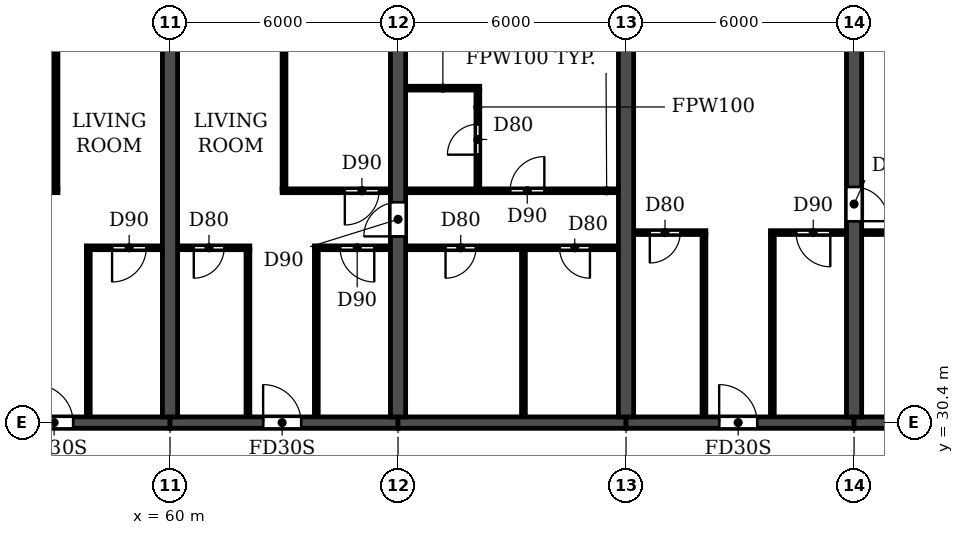
"""IFC4 building model, lengths in metres.
Left out: names, types, materials, properties, quantities, classifications, styles, units other than length and angle.
Written with IfcOpenShell. Run it as: python <this file> out.ifc"""

import sys

from ifc_helpers import new_model, si_unit, direction, frame, frame_2d, origin, place, context, subcontext, project, spatial, rectangle, extrude, element, fill, save


model = new_model("IFC4")
c1 = context("Model", 3, precision=1e-05, world=origin(), true_north=direction((0.0, 1.0)))
c2 = subcontext(c1, "Body", "Model", "MODEL_VIEW")
j1 = project(units=[si_unit("LENGTHUNIT", "METRE"), si_unit("PLANEANGLEUNIT", "RADIAN")], contexts=[c1])
p1 = place(None, origin())
s1 = spatial("IfcSite", under=j1, at=p1, CompositionType="ELEMENT")
p2 = place(p1, origin())
s2 = spatial("IfcBuilding", under=s1, at=p2, CompositionType="ELEMENT")
p3 = place(p2, frame((0.0, 0.0, 23.4)))
s3 = spatial("IfcBuildingStorey", under=s2, at=p3, CompositionType="ELEMENT", Elevation=23.4)
p4 = place(p3, frame((60.0, 30.55, 0.0), z_axis=(0.0, 0.0, 1.0), x_axis=(0.0, 1.0, 0.0)))
e1 = element("IfcWall", 1, at=p4, inside=s3, PredefinedType="SHEAR", context=c2, shape_type="SweptSolid", body=[
    extrude(rectangle(XDim=14.05, YDim=0.4, at=frame_2d((7.025, 0.0))), origin(), (0.0, 0.0, 1.0), 3.05),
])
p5 = place(p3, frame((66.0, 30.55, 0.0), z_axis=(0.0, 0.0, 1.0), x_axis=(0.0, 1.0, 0.0)))
e2 = element("IfcWall", 2, at=p5, inside=s3, PredefinedType="SHEAR", context=c2, shape_type="SweptSolid", body=[
    extrude(rectangle(XDim=14.05, YDim=0.4, at=frame_2d((7.025, 0.0))), origin(), (0.0, 0.0, 1.0), 3.05),
])
p6 = place(p5, frame((4.75, 0.0, 0.0)))
e3 = element("IfcOpeningElement", 3, at=p6, cuts=e2, PredefinedType="OPENING", context=c2, shape_type="SweptSolid", body=[
    extrude(rectangle(XDim=0.9, YDim=2.1, at=frame_2d((0.45, 1.05))), frame((0.0, 0.21, 0.0), z_axis=(0.0, -1.0, 0.0), x_axis=(1.0, 0.0, 0.0)), (0.0, 0.0, 1.0), 0.42),
])
p7 = place(p3, frame((72.0, 30.55, 0.0), z_axis=(0.0, 0.0, 1.0), x_axis=(0.0, 1.0, 0.0)))
e4 = element("IfcWall", 4, at=p7, inside=s3, PredefinedType="SHEAR", context=c2, shape_type="SweptSolid", body=[
    extrude(rectangle(XDim=14.05, YDim=0.4, at=frame_2d((7.025, 0.0))), origin(), (0.0, 0.0, 1.0), 3.05),
])
p8 = place(p3, frame((78.0, 30.55, 0.0), z_axis=(0.0, 0.0, 1.0), x_axis=(0.0, 1.0, 0.0)))
e5 = element("IfcWall", 5, at=p8, inside=s3, PredefinedType="SHEAR", context=c2, shape_type="SweptSolid", body=[
    extrude(rectangle(XDim=14.05, YDim=0.4, at=frame_2d((7.025, 0.0))), origin(), (0.0, 0.0, 1.0), 3.05),
])
p9 = place(p8, frame((5.15, 0.0, 0.0)))
e6 = element("IfcOpeningElement", 6, at=p9, cuts=e5, PredefinedType="OPENING", context=c2, shape_type="SweptSolid", body=[
    extrude(rectangle(XDim=0.9, YDim=2.1, at=frame_2d((0.45, 1.05))), frame((0.0, 0.21, 0.0), z_axis=(0.0, -1.0, 0.0), x_axis=(1.0, 0.0, 0.0)), (0.0, 0.0, 1.0), 0.42),
])
p10 = place(p3, frame((54.0, 30.4, 0.0), z_axis=(0.0, 0.0, 1.0), x_axis=(1.0, 0.0, 0.0)))
e7 = element("IfcWall", 7, at=p10, inside=s3, PredefinedType="SHEAR", context=c2, shape_type="SweptSolid", body=[
    extrude(rectangle(XDim=6.0, YDim=0.3, at=frame_2d((3.0, 0.0))), origin(), (0.0, 0.0, 1.0), 2.45),
])
p11 = place(p10, frame((2.45, 0.0, 0.0)))
e8 = element("IfcOpeningElement", 8, at=p11, cuts=e7, PredefinedType="OPENING", context=c2, shape_type="SweptSolid", body=[
    extrude(rectangle(XDim=1.0, YDim=2.1, at=frame_2d((0.5, 1.05))), frame((0.0, 0.16, 0.0), z_axis=(0.0, -1.0, 0.0), x_axis=(1.0, 0.0, 0.0)), (0.0, 0.0, 1.0), 0.32),
])
p12 = place(p3, frame((60.0, 30.4, 0.0), z_axis=(0.0, 0.0, 1.0), x_axis=(1.0, 0.0, 0.0)))
e9 = element("IfcWall", 9, at=p12, inside=s3, PredefinedType="SHEAR", context=c2, shape_type="SweptSolid", body=[
    extrude(rectangle(XDim=6.0, YDim=0.3, at=frame_2d((3.0, 0.0))), origin(), (0.0, 0.0, 1.0), 2.45),
])
p13 = place(p12, frame((2.45, 0.0, 0.0)))
e10 = element("IfcOpeningElement", 10, at=p13, cuts=e9, PredefinedType="OPENING", context=c2, shape_type="SweptSolid", body=[
    extrude(rectangle(XDim=1.0, YDim=2.1, at=frame_2d((0.5, 1.05))), frame((0.0, 0.16, 0.0), z_axis=(0.0, -1.0, 0.0), x_axis=(1.0, 0.0, 0.0)), (0.0, 0.0, 1.0), 0.32),
])
p14 = place(p3, frame((66.0, 30.4, 0.0), z_axis=(0.0, 0.0, 1.0), x_axis=(1.0, 0.0, 0.0)))
e11 = element("IfcWall", 11, at=p14, inside=s3, PredefinedType="SHEAR", context=c2, shape_type="SweptSolid", body=[
    extrude(rectangle(XDim=6.0, YDim=0.3, at=frame_2d((3.0, 0.0))), origin(), (0.0, 0.0, 1.0), 2.45),
])
p15 = place(p3, frame((72.0, 30.4, 0.0), z_axis=(0.0, 0.0, 1.0), x_axis=(1.0, 0.0, 0.0)))
e12 = element("IfcWall", 12, at=p15, inside=s3, PredefinedType="SHEAR", context=c2, shape_type="SweptSolid", body=[
    extrude(rectangle(XDim=6.0, YDim=0.3, at=frame_2d((3.0, 0.0))), origin(), (0.0, 0.0, 1.0), 2.45),
])
p16 = place(p15, frame((2.45, 0.0, 0.0)))
e13 = element("IfcOpeningElement", 13, at=p16, cuts=e12, PredefinedType="OPENING", context=c2, shape_type="SweptSolid", body=[
    extrude(rectangle(XDim=1.0, YDim=2.1, at=frame_2d((0.5, 1.05))), frame((0.0, 0.16, 0.0), z_axis=(0.0, -1.0, 0.0), x_axis=(1.0, 0.0, 0.0)), (0.0, 0.0, 1.0), 0.32),
])
p17 = place(p3, frame((78.0, 30.4, 0.0), z_axis=(0.0, 0.0, 1.0), x_axis=(1.0, 0.0, 0.0)))
e14 = element("IfcWall", 14, at=p17, inside=s3, PredefinedType="SHEAR", context=c2, shape_type="SweptSolid", body=[
    extrude(rectangle(XDim=6.0, YDim=0.3, at=frame_2d((3.0, 0.0))), origin(), (0.0, 0.0, 1.0), 2.45),
])
p18 = place(p3, frame((57.8, 35.0, 0.0), z_axis=(0.0, 0.0, 1.0), x_axis=(1.0, 0.0, 0.0)))
e15 = element("IfcWall", 15, at=p18, inside=s3, PredefinedType="PARTITIONING", context=c2, shape_type="SweptSolid", body=[
    extrude(rectangle(XDim=1.99, YDim=0.1, at=frame_2d((0.995, 0.0))), origin(), (0.0, 0.0, 1.0), 3.05),
])
p19 = place(p18, frame((0.675, 0.0, 0.0)))
e16 = element("IfcOpeningElement", 16, at=p19, cuts=e15, PredefinedType="OPENING", context=c2, shape_type="SweptSolid", body=[
    extrude(rectangle(XDim=0.9, YDim=2.1, at=frame_2d((0.45, 1.05))), frame((0.0, 0.06, 0.0), z_axis=(0.0, -1.0, 0.0), x_axis=(1.0, 0.0, 0.0)), (0.0, 0.0, 1.0), 0.12),
])
p20 = place(p3, frame((60.21, 35.0, 0.0), z_axis=(0.0, 0.0, 1.0), x_axis=(1.0, 0.0, 0.0)))
e17 = element("IfcWall", 17, at=p20, inside=s3, PredefinedType="PARTITIONING", context=c2, shape_type="SweptSolid", body=[
    extrude(rectangle(XDim=1.89, YDim=0.1, at=frame_2d((0.945, 0.0))), origin(), (0.0, 0.0, 1.0), 3.05),
])
p21 = place(p20, frame((0.415, 0.0, 0.0)))
e18 = element("IfcOpeningElement", 18, at=p21, cuts=e17, PredefinedType="OPENING", context=c2, shape_type="SweptSolid", body=[
    extrude(rectangle(XDim=0.8, YDim=2.1, at=frame_2d((0.4, 1.05))), frame((0.0, 0.06, 0.0), z_axis=(0.0, -1.0, 0.0), x_axis=(1.0, 0.0, 0.0)), (0.0, 0.0, 1.0), 0.12),
])
p22 = place(p3, frame((63.8, 35.0, 0.0), z_axis=(0.0, 0.0, 1.0), x_axis=(1.0, 0.0, 0.0)))
e19 = element("IfcWall", 19, at=p22, inside=s3, PredefinedType="PARTITIONING", context=c2, shape_type="SweptSolid", body=[
    extrude(rectangle(XDim=1.99, YDim=0.1, at=frame_2d((0.995, 0.0))), origin(), (0.0, 0.0, 1.0), 3.05),
])
p23 = place(p22, frame((0.675, 0.0, 0.0)))
e20 = element("IfcOpeningElement", 20, at=p23, cuts=e19, PredefinedType="OPENING", context=c2, shape_type="SweptSolid", body=[
    extrude(rectangle(XDim=0.9, YDim=2.1, at=frame_2d((0.45, 1.05))), frame((0.0, 0.06, 0.0), z_axis=(0.0, -1.0, 0.0), x_axis=(1.0, 0.0, 0.0)), (0.0, 0.0, 1.0), 0.12),
])
p24 = place(p3, frame((66.21, 35.0, 0.0), z_axis=(0.0, 0.0, 1.0), x_axis=(1.0, 0.0, 0.0)))
e21 = element("IfcWall", 21, at=p24, inside=s3, PredefinedType="PARTITIONING", context=c2, shape_type="SweptSolid", body=[
    extrude(rectangle(XDim=5.58, YDim=0.1, at=frame_2d((2.79, 0.0))), origin(), (0.0, 0.0, 1.0), 3.05),
])
p25 = place(p24, frame((1.04, 0.0, 0.0)))
e22 = element("IfcOpeningElement", 22, at=p25, cuts=e21, PredefinedType="OPENING", context=c2, shape_type="SweptSolid", body=[
    extrude(rectangle(XDim=0.8, YDim=2.1, at=frame_2d((0.4, 1.05))), frame((0.0, 0.06, 0.0), z_axis=(0.0, -1.0, 0.0), x_axis=(1.0, 0.0, 0.0)), (0.0, 0.0, 1.0), 0.12),
])
p26 = place(p24, frame((4.04, 0.0, 0.0)))
e23 = element("IfcOpeningElement", 23, at=p26, cuts=e21, PredefinedType="OPENING", context=c2, shape_type="SweptSolid", body=[
    extrude(rectangle(XDim=0.8, YDim=2.1, at=frame_2d((0.4, 1.05))), frame((0.0, 0.06, 0.0), z_axis=(0.0, -1.0, 0.0), x_axis=(1.0, 0.0, 0.0)), (0.0, 0.0, 1.0), 0.12),
])
p27 = place(p3, frame((72.21, 35.4, 0.0), z_axis=(0.0, 0.0, 1.0), x_axis=(1.0, 0.0, 0.0)))
e24 = element("IfcWall", 24, at=p27, inside=s3, PredefinedType="PARTITIONING", context=c2, shape_type="SweptSolid", body=[
    extrude(rectangle(XDim=1.89, YDim=0.1, at=frame_2d((0.945, 0.0))), origin(), (0.0, 0.0, 1.0), 3.05),
])
p28 = place(p27, frame((0.415, 0.0, 0.0)))
e25 = element("IfcOpeningElement", 25, at=p28, cuts=e24, PredefinedType="OPENING", context=c2, shape_type="SweptSolid", body=[
    extrude(rectangle(XDim=0.8, YDim=2.1, at=frame_2d((0.4, 1.05))), frame((0.0, 0.06, 0.0), z_axis=(0.0, -1.0, 0.0), x_axis=(1.0, 0.0, 0.0)), (0.0, 0.0, 1.0), 0.12),
])
p29 = place(p3, frame((75.8, 35.4, 0.0), z_axis=(0.0, 0.0, 1.0), x_axis=(1.0, 0.0, 0.0)))
e26 = element("IfcWall", 26, at=p29, inside=s3, PredefinedType="PARTITIONING", context=c2, shape_type="SweptSolid", body=[
    extrude(rectangle(XDim=1.99, YDim=0.1, at=frame_2d((0.995, 0.0))), origin(), (0.0, 0.0, 1.0), 3.05),
])
p30 = place(p29, frame((0.675, 0.0, 0.0)))
e27 = element("IfcOpeningElement", 27, at=p30, cuts=e26, PredefinedType="OPENING", context=c2, shape_type="SweptSolid", body=[
    extrude(rectangle(XDim=0.9, YDim=2.1, at=frame_2d((0.45, 1.05))), frame((0.0, 0.06, 0.0), z_axis=(0.0, -1.0, 0.0), x_axis=(1.0, 0.0, 0.0)), (0.0, 0.0, 1.0), 0.12),
])
p31 = place(p3, frame((78.21, 35.4, 0.0), z_axis=(0.0, 0.0, 1.0), x_axis=(1.0, 0.0, 0.0)))
e28 = element("IfcWall", 28, at=p31, inside=s3, PredefinedType="PARTITIONING", context=c2, shape_type="SweptSolid", body=[
    extrude(rectangle(XDim=2.69, YDim=0.1, at=frame_2d((1.345, 0.0))), origin(), (0.0, 0.0, 1.0), 3.05),
])
p32 = place(p31, frame((0.89, 0.0, 0.0)))
e29 = element("IfcOpeningElement", 29, at=p32, cuts=e28, PredefinedType="OPENING", context=c2, shape_type="SweptSolid", body=[
    extrude(rectangle(XDim=0.8, YDim=2.1, at=frame_2d((0.4, 1.05))), frame((0.0, 0.06, 0.0), z_axis=(0.0, -1.0, 0.0), x_axis=(1.0, 0.0, 0.0)), (0.0, 0.0, 1.0), 0.12),
])
p33 = place(p3, frame((54.21, 36.5, 0.0), z_axis=(0.0, 0.0, 1.0), x_axis=(1.0, 0.0, 0.0)))
e30 = element("IfcWall", 30, at=p33, inside=s3, PredefinedType="PARTITIONING", context=c2, shape_type="SweptSolid", body=[
    extrude(rectangle(XDim=2.84, YDim=0.1, at=frame_2d((1.42, 0.0))), origin(), (0.0, 0.0, 1.0), 3.05),
])
p34 = place(p33, frame((1.39, 0.0, 0.0)))
e31 = element("IfcOpeningElement", 31, at=p34, cuts=e30, PredefinedType="OPENING", context=c2, shape_type="SweptSolid", body=[
    extrude(rectangle(XDim=0.9, YDim=2.1, at=frame_2d((0.45, 1.05))), frame((0.0, 0.06, 0.0), z_axis=(0.0, -1.0, 0.0), x_axis=(1.0, 0.0, 0.0)), (0.0, 0.0, 1.0), 0.12),
])
p35 = place(p3, frame((62.95, 36.5, 0.0), z_axis=(0.0, 0.0, 1.0), x_axis=(1.0, 0.0, 0.0)))
e32 = element("IfcWall", 32, at=p35, inside=s3, PredefinedType="PARTITIONING", context=c2, shape_type="SweptSolid", body=[
    extrude(rectangle(XDim=2.84, YDim=0.1, at=frame_2d((1.42, 0.0))), origin(), (0.0, 0.0, 1.0), 3.05),
])
p36 = place(p35, frame((1.65, 0.0, 0.0)))
e33 = element("IfcOpeningElement", 33, at=p36, cuts=e32, PredefinedType="OPENING", context=c2, shape_type="SweptSolid", body=[
    extrude(rectangle(XDim=0.9, YDim=2.1, at=frame_2d((0.45, 1.05))), frame((0.0, 0.06, 0.0), z_axis=(0.0, -1.0, 0.0), x_axis=(1.0, 0.0, 0.0)), (0.0, 0.0, 1.0), 0.12),
])
p37 = place(p3, frame((66.21, 36.5, 0.0), z_axis=(0.0, 0.0, 1.0), x_axis=(1.0, 0.0, 0.0)))
e34 = element("IfcWall", 34, at=p37, inside=s3, PredefinedType="PARTITIONING", context=c2, shape_type="SweptSolid", body=[
    extrude(rectangle(XDim=5.58, YDim=0.1, at=frame_2d((2.79, 0.0))), origin(), (0.0, 0.0, 1.0), 3.05),
])
p38 = place(p37, frame((2.74, 0.0, 0.0)))
e35 = element("IfcOpeningElement", 35, at=p38, cuts=e34, PredefinedType="OPENING", context=c2, shape_type="SweptSolid", body=[
    extrude(rectangle(XDim=0.9, YDim=2.1, at=frame_2d((0.45, 1.05))), frame((0.0, 0.06, 0.0), z_axis=(0.0, -1.0, 0.0), x_axis=(1.0, 0.0, 0.0)), (0.0, 0.0, 1.0), 0.12),
])
p39 = place(p3, frame((66.21, 39.2, 0.0), z_axis=(0.0, 0.0, 1.0), x_axis=(1.0, 0.0, 0.0)))
e36 = element("IfcWall", 36, at=p39, inside=s3, PredefinedType="PARTITIONING", context=c2, shape_type="SweptSolid", body=[
    extrude(rectangle(XDim=1.94, YDim=0.1, at=frame_2d((0.97, 0.0))), origin(), (0.0, 0.0, 1.0), 3.05),
])
p40 = place(p3, frame((57.0, 36.55, 0.0), z_axis=(0.0, 0.0, 1.0), x_axis=(0.0, 1.0, 0.0)))
e37 = element("IfcWall", 37, at=p40, inside=s3, PredefinedType="PARTITIONING", context=c2, shape_type="SweptSolid", body=[
    extrude(rectangle(XDim=8.19, YDim=0.1, at=frame_2d((4.095, 0.0))), origin(), (0.0, 0.0, 1.0), 3.05),
])
for number, where, z_axis, x_axis in (
    (38, (57.85, 30.56, 0.0), (0.0, 0.0, 1.0), (0.0, 1.0, 0.0)),
    (39, (62.05, 30.56, 0.0), (0.0, 0.0, 1.0), (0.0, 1.0, 0.0)),
):
    element("IfcWall", number, at=place(p3, frame(where, z_axis=z_axis, x_axis=x_axis)), inside=s3, PredefinedType="PARTITIONING", context=c2, shape_type="SweptSolid", body=[
        extrude(rectangle(XDim=4.39, YDim=0.1, at=frame_2d((2.195, 0.0))), origin(), (0.0, 0.0, 1.0), 3.05),
    ])
p41 = place(p3, frame((63.0, 36.55, 0.0), z_axis=(0.0, 0.0, 1.0), x_axis=(0.0, 1.0, 0.0)))
e40 = element("IfcWall", 40, at=p41, inside=s3, PredefinedType="PARTITIONING", context=c2, shape_type="SweptSolid", body=[
    extrude(rectangle(XDim=8.19, YDim=0.1, at=frame_2d((4.095, 0.0))), origin(), (0.0, 0.0, 1.0), 3.05),
])
p42 = place(p3, frame((63.85, 30.56, 0.0), z_axis=(0.0, 0.0, 1.0), x_axis=(0.0, 1.0, 0.0)))
e41 = element("IfcWall", 41, at=p42, inside=s3, PredefinedType="PARTITIONING", context=c2, shape_type="SweptSolid", body=[
    extrude(rectangle(XDim=4.39, YDim=0.1, at=frame_2d((2.195, 0.0))), origin(), (0.0, 0.0, 1.0), 3.05),
])
p43 = place(p3, frame((68.1, 36.55, 0.0), z_axis=(0.0, 0.0, 1.0), x_axis=(0.0, 1.0, 0.0)))
e42 = element("IfcWall", 42, at=p43, inside=s3, PredefinedType="PARTITIONING", context=c2, shape_type="SweptSolid", body=[
    extrude(rectangle(XDim=2.6, YDim=0.1, at=frame_2d((1.3, 0.0))), origin(), (0.0, 0.0, 1.0), 3.05),
])
p44 = place(p43, frame((0.9, 0.0, 0.0)))
e43 = element("IfcOpeningElement", 43, at=p44, cuts=e42, PredefinedType="OPENING", context=c2, shape_type="SweptSolid", body=[
    extrude(rectangle(XDim=0.8, YDim=2.1, at=frame_2d((0.4, 1.05))), frame((0.0, 0.06, 0.0), z_axis=(0.0, -1.0, 0.0), x_axis=(1.0, 0.0, 0.0)), (0.0, 0.0, 1.0), 0.12),
])
p45 = place(p3, frame((69.3, 30.56, 0.0), z_axis=(0.0, 0.0, 1.0), x_axis=(0.0, 1.0, 0.0)))
e44 = element("IfcWall", 44, at=p45, inside=s3, PredefinedType="PARTITIONING", context=c2, shape_type="SweptSolid", body=[
    extrude(rectangle(XDim=4.39, YDim=0.1, at=frame_2d((2.195, 0.0))), origin(), (0.0, 0.0, 1.0), 3.05),
])
for number, where, z_axis, x_axis in (
    (45, (74.05, 30.56, 0.0), (0.0, 0.0, 1.0), (0.0, 1.0, 0.0)),
    (46, (75.85, 30.56, 0.0), (0.0, 0.0, 1.0), (0.0, 1.0, 0.0)),
):
    element("IfcWall", number, at=place(p3, frame(where, z_axis=z_axis, x_axis=x_axis)), inside=s3, PredefinedType="PARTITIONING", context=c2, shape_type="SweptSolid", body=[
        extrude(rectangle(XDim=4.79, YDim=0.1, at=frame_2d((2.395, 0.0))), origin(), (0.0, 0.0, 1.0), 3.05),
    ])
p46 = place(p11, origin())
e47 = element("IfcDoor", 47, at=p46, inside=s3, OperationType="SINGLE_SWING_LEFT", PredefinedType="DOOR", context=c2, shape_type="SweptSolid", body=[
    extrude(rectangle(XDim=1.0, YDim=2.1, at=frame_2d((0.5, 1.05))), frame((0.0, 0.025, 0.0), z_axis=(0.0, -1.0, 0.0), x_axis=(1.0, 0.0, 0.0)), (0.0, 0.0, 1.0), 0.05),
])
fill(e8, e47)
p47 = place(p19, frame((0.9, 0.0, 0.0), z_axis=(0.0, 0.0, 1.0), x_axis=(-1.0, 0.0, 0.0)))
e48 = element("IfcDoor", 48, at=p47, inside=s3, OperationType="SINGLE_SWING_RIGHT", PredefinedType="DOOR", context=c2, shape_type="SweptSolid", body=[
    extrude(rectangle(XDim=0.9, YDim=2.1, at=frame_2d((0.45, 1.05))), frame((0.0, 0.025, 0.0), z_axis=(0.0, -1.0, 0.0), x_axis=(1.0, 0.0, 0.0)), (0.0, 0.0, 1.0), 0.05),
])
fill(e16, e48)
p48 = place(p25, frame((0.8, 0.0, 0.0), z_axis=(0.0, 0.0, 1.0), x_axis=(-1.0, 0.0, 0.0)))
e49 = element("IfcDoor", 49, at=p48, inside=s3, OperationType="SINGLE_SWING_RIGHT", PredefinedType="DOOR", context=c2, shape_type="SweptSolid", body=[
    extrude(rectangle(XDim=0.8, YDim=2.1, at=frame_2d((0.4, 1.05))), frame((0.0, 0.025, 0.0), z_axis=(0.0, -1.0, 0.0), x_axis=(1.0, 0.0, 0.0)), (0.0, 0.0, 1.0), 0.05),
])
fill(e22, e49)
p49 = place(p38, origin())
e50 = element("IfcDoor", 50, at=p49, inside=s3, OperationType="SINGLE_SWING_RIGHT", PredefinedType="DOOR", context=c2, shape_type="SweptSolid", body=[
    extrude(rectangle(XDim=0.9, YDim=2.1, at=frame_2d((0.45, 1.05))), frame((0.0, 0.025, 0.0), z_axis=(0.0, -1.0, 0.0), x_axis=(1.0, 0.0, 0.0)), (0.0, 0.0, 1.0), 0.05),
])
fill(e35, e50)
p50 = place(p26, frame((0.8, 0.0, 0.0), z_axis=(0.0, 0.0, 1.0), x_axis=(-1.0, 0.0, 0.0)))
e51 = element("IfcDoor", 51, at=p50, inside=s3, OperationType="SINGLE_SWING_LEFT", PredefinedType="DOOR", context=c2, shape_type="SweptSolid", body=[
    extrude(rectangle(XDim=0.8, YDim=2.1, at=frame_2d((0.4, 1.05))), frame((0.0, 0.025, 0.0), z_axis=(0.0, -1.0, 0.0), x_axis=(1.0, 0.0, 0.0)), (0.0, 0.0, 1.0), 0.05),
])
fill(e23, e51)
p51 = place(p21, frame((0.8, 0.0, 0.0), z_axis=(0.0, 0.0, 1.0), x_axis=(-1.0, 0.0, 0.0)))
e52 = element("IfcDoor", 52, at=p51, inside=s3, OperationType="SINGLE_SWING_RIGHT", PredefinedType="DOOR", context=c2, shape_type="SweptSolid", body=[
    extrude(rectangle(XDim=0.8, YDim=2.1, at=frame_2d((0.4, 1.05))), frame((0.0, 0.025, 0.0), z_axis=(0.0, -1.0, 0.0), x_axis=(1.0, 0.0, 0.0)), (0.0, 0.0, 1.0), 0.05),
])
fill(e18, e52)
p52 = place(p13, origin())
e53 = element("IfcDoor", 53, at=p52, inside=s3, OperationType="SINGLE_SWING_LEFT", PredefinedType="DOOR", context=c2, shape_type="SweptSolid", body=[
    extrude(rectangle(XDim=1.0, YDim=2.1, at=frame_2d((0.5, 1.05))), frame((0.0, 0.025, 0.0), z_axis=(0.0, -1.0, 0.0), x_axis=(1.0, 0.0, 0.0)), (0.0, 0.0, 1.0), 0.05),
])
fill(e10, e53)
p53 = place(p23, frame((0.9, 0.0, 0.0), z_axis=(0.0, 0.0, 1.0), x_axis=(-1.0, 0.0, 0.0)))
e54 = element("IfcDoor", 54, at=p53, inside=s3, OperationType="SINGLE_SWING_LEFT", PredefinedType="DOOR", context=c2, shape_type="SweptSolid", body=[
    extrude(rectangle(XDim=0.9, YDim=2.1, at=frame_2d((0.45, 1.05))), frame((0.0, 0.025, 0.0), z_axis=(0.0, -1.0, 0.0), x_axis=(1.0, 0.0, 0.0)), (0.0, 0.0, 1.0), 0.05),
])
fill(e20, e54)
p54 = place(p36, frame((0.9, 0.0, 0.0), z_axis=(0.0, 0.0, 1.0), x_axis=(-1.0, 0.0, 0.0)))
e55 = element("IfcDoor", 55, at=p54, inside=s3, OperationType="SINGLE_SWING_RIGHT", PredefinedType="DOOR", context=c2, shape_type="SweptSolid", body=[
    extrude(rectangle(XDim=0.9, YDim=2.1, at=frame_2d((0.45, 1.05))), frame((0.0, 0.025, 0.0), z_axis=(0.0, -1.0, 0.0), x_axis=(1.0, 0.0, 0.0)), (0.0, 0.0, 1.0), 0.05),
])
fill(e33, e55)
p55 = place(p6, origin())
e56 = element("IfcDoor", 56, at=p55, inside=s3, OperationType="SINGLE_SWING_LEFT", PredefinedType="DOOR", context=c2, shape_type="SweptSolid", body=[
    extrude(rectangle(XDim=0.9, YDim=2.1, at=frame_2d((0.45, 1.05))), frame((0.0, 0.025, 0.0), z_axis=(0.0, -1.0, 0.0), x_axis=(1.0, 0.0, 0.0)), (0.0, 0.0, 1.0), 0.05),
])
fill(e3, e56)
p56 = place(p44, origin())
e57 = element("IfcDoor", 57, at=p56, inside=s3, OperationType="SINGLE_SWING_LEFT", PredefinedType="DOOR", context=c2, shape_type="SweptSolid", body=[
    extrude(rectangle(XDim=0.8, YDim=2.1, at=frame_2d((0.4, 1.05))), frame((0.0, 0.025, 0.0), z_axis=(0.0, -1.0, 0.0), x_axis=(1.0, 0.0, 0.0)), (0.0, 0.0, 1.0), 0.05),
])
fill(e43, e57)
p57 = place(p28, frame((0.8, 0.0, 0.0), z_axis=(0.0, 0.0, 1.0), x_axis=(-1.0, 0.0, 0.0)))
e58 = element("IfcDoor", 58, at=p57, inside=s3, OperationType="SINGLE_SWING_RIGHT", PredefinedType="DOOR", context=c2, shape_type="SweptSolid", body=[
    extrude(rectangle(XDim=0.8, YDim=2.1, at=frame_2d((0.4, 1.05))), frame((0.0, 0.025, 0.0), z_axis=(0.0, -1.0, 0.0), x_axis=(1.0, 0.0, 0.0)), (0.0, 0.0, 1.0), 0.05),
])
fill(e25, e58)
p58 = place(p16, origin())
e59 = element("IfcDoor", 59, at=p58, inside=s3, OperationType="SINGLE_SWING_LEFT", PredefinedType="DOOR", context=c2, shape_type="SweptSolid", body=[
    extrude(rectangle(XDim=1.0, YDim=2.1, at=frame_2d((0.5, 1.05))), frame((0.0, 0.025, 0.0), z_axis=(0.0, -1.0, 0.0), x_axis=(1.0, 0.0, 0.0)), (0.0, 0.0, 1.0), 0.05),
])
fill(e13, e59)
p59 = place(p30, frame((0.9, 0.0, 0.0), z_axis=(0.0, 0.0, 1.0), x_axis=(-1.0, 0.0, 0.0)))
e60 = element("IfcDoor", 60, at=p59, inside=s3, OperationType="SINGLE_SWING_LEFT", PredefinedType="DOOR", context=c2, shape_type="SweptSolid", body=[
    extrude(rectangle(XDim=0.9, YDim=2.1, at=frame_2d((0.45, 1.05))), frame((0.0, 0.025, 0.0), z_axis=(0.0, -1.0, 0.0), x_axis=(1.0, 0.0, 0.0)), (0.0, 0.0, 1.0), 0.05),
])
fill(e27, e60)
p60 = place(p9, frame((0.9, 0.0, 0.0), z_axis=(0.0, 0.0, 1.0), x_axis=(-1.0, 0.0, 0.0)))
e61 = element("IfcDoor", 61, at=p60, inside=s3, OperationType="SINGLE_SWING_RIGHT", PredefinedType="DOOR", context=c2, shape_type="SweptSolid", body=[
    extrude(rectangle(XDim=0.9, YDim=2.1, at=frame_2d((0.45, 1.05))), frame((0.0, 0.025, 0.0), z_axis=(0.0, -1.0, 0.0), x_axis=(1.0, 0.0, 0.0)), (0.0, 0.0, 1.0), 0.05),
])
fill(e6, e61)
save(model, sys.argv[1])
